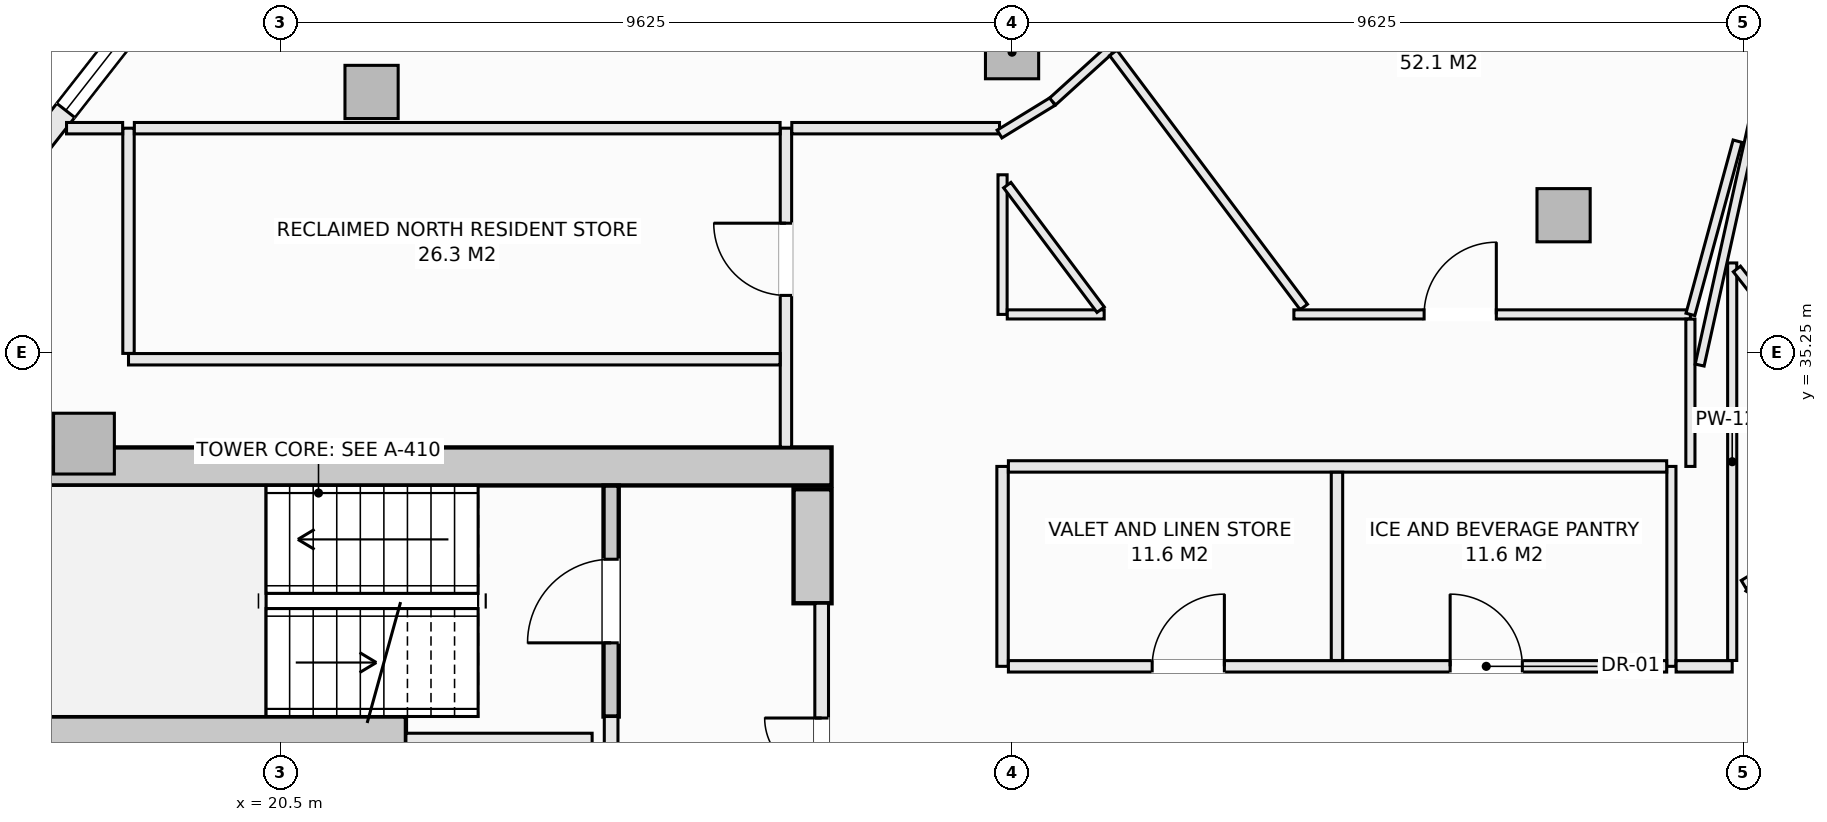
"""IFC4 building model, lengths in metres.
Left out: names, types, materials, properties, quantities, classifications, styles, units other than length and angle.
Written with IfcOpenShell. Run it as: python <this file> out.ifc"""

import sys

from ifc_helpers import new_model, si_unit, direction, frame, frame_2d, origin, origin_2d, place, context, subcontext, project, spatial, rectangle, extrude, element, fill, save


model = new_model("IFC4")
c1 = context("Model", 3, precision=1e-05, world=origin(), true_north=direction((0.0, 1.0)))
c2 = subcontext(c1, "Body", "Model", "MODEL_VIEW")
j1 = project(units=[si_unit("LENGTHUNIT", "METRE"), si_unit("PLANEANGLEUNIT", "RADIAN")], contexts=[c1])
p1 = place(None, origin())
s1 = spatial("IfcSite", under=j1, at=p1, CompositionType="ELEMENT")
p2 = place(p1, origin())
s2 = spatial("IfcBuilding", under=s1, at=p2, CompositionType="ELEMENT")
p3 = place(p2, frame((0.0, 0.0, 262.4)))
s3 = spatial("IfcBuildingStorey", under=s2, at=p3, CompositionType="ELEMENT", Elevation=262.4)
p4 = place(p3, frame((14.25, 33.75, -0.27), z_axis=(0.0, 0.0, 1.0), x_axis=(1.0, 0.0, 0.0)))
e1 = element("IfcWall", 1, at=p4, inside=s3, PredefinedType="SHEAR", context=c2, shape_type="SweptSolid", body=[
    extrude(rectangle(XDim=13.5, YDim=0.5, at=frame_2d((6.75, 0.0))), origin(), (0.0, 0.0, 1.0), 3.3),
])
p5 = place(p3, frame((27.5, 31.95, -0.27), z_axis=(0.0, 0.0, 1.0), x_axis=(0.0, 1.0, 0.0)))
e2 = element("IfcWall", 2, at=p5, inside=s3, PredefinedType="SHEAR", context=c2, shape_type="SweptSolid", body=[
    extrude(rectangle(XDim=1.5, YDim=0.5, at=frame_2d((0.75, 0.0))), origin(), (0.0, 0.0, 1.0), 3.3),
])
p6 = place(p3, frame((14.85, 30.25, -0.27), z_axis=(0.0, 0.0, 1.0), x_axis=(1.0, 0.0, 0.0)))
e3 = element("IfcWall", 3, at=p6, inside=s3, PredefinedType="SHEAR", context=c2, shape_type="SweptSolid", body=[
    extrude(rectangle(XDim=7.3, YDim=0.42, at=frame_2d((3.65, 0.0))), origin(), (0.0, 0.0, 1.0), 3.3),
])
for number, where, z_axis, x_axis in (
    (4, (37.382, 37.055, -0.27), (0.0, 0.0, 1.0), (1.0, 0.0, 0.0)),
    (5, (30.125, 39.2, -0.27), (0.0, 0.0, 1.0), (1.0, 0.0, 0.0)),
    (6, (21.698, 38.677, -0.27), (0.0, 0.0, 1.0), (1.0, 0.0, 0.0)),
):
    element("IfcColumn", number, at=place(p3, frame(where, z_axis=z_axis, x_axis=x_axis)), inside=s3, PredefinedType="COLUMN", context=c2, shape_type="SweptSolid", body=[
        extrude(rectangle(XDim=0.7, YDim=0.7, at=origin_2d()), origin(), (0.0, 0.0, 1.0), 3.3),
    ])
p7 = place(p3, frame((17.914, 34.05, -0.27), z_axis=(0.0, 0.0, 1.0), x_axis=(1.0, 0.0, 0.0)))
e7 = element("IfcColumn", 7, at=p7, inside=s3, PredefinedType="PILASTER", context=c2, shape_type="SweptSolid", body=[
    extrude(rectangle(XDim=0.8, YDim=0.8, at=origin_2d()), origin(), (0.0, 0.0, 1.0), 3.3),
])
p8 = place(p3, frame((16.846, 37.375, 0.0), z_axis=(0.0, 0.0, 1.0), x_axis=(0.616413297421, 0.78742278781, 0.0)))
e8 = element("IfcWall", 8, at=p8, inside=s3, PredefinedType="SOLIDWALL", context=c2, shape_type="SweptSolid", body=[
    extrude(rectangle(XDim=4.888, YDim=0.3, at=frame_2d((2.444, 0.0))), origin(), (0.0, 0.0, 1.0), 2.605),
])
p9 = place(p8, frame((1.344, 0.0, 0.72)))
e9 = element("IfcOpeningElement", 9, at=p9, cuts=e8, PredefinedType="OPENING", context=c2, shape_type="SweptSolid", body=[
    extrude(rectangle(XDim=2.2, YDim=1.65, at=frame_2d((1.1, 0.825))), frame((0.0, 0.16, 0.0), z_axis=(0.0, -1.0, 0.0), x_axis=(1.0, 0.0, 0.0)), (0.0, 0.0, 1.0), 0.32),
])
p10 = place(p3, frame((24.85, 30.46, -0.27), z_axis=(0.0, 0.0, 1.0), x_axis=(0.0, 1.0, 0.0)))
e10 = element("IfcWall", 10, at=p10, inside=s3, PredefinedType="SHEAR", context=c2, shape_type="SweptSolid", body=[
    extrude(rectangle(XDim=3.038, YDim=0.2, at=frame_2d((1.519, 0.0))), origin(), (0.0, 0.0, 1.0), 3.3),
])
p11 = place(p10, frame((0.969, 0.0, 0.27)))
e11 = element("IfcOpeningElement", 11, at=p11, cuts=e10, PredefinedType="OPENING", context=c2, shape_type="SweptSolid", body=[
    extrude(rectangle(XDim=1.1, YDim=2.15, at=frame_2d((0.55, 1.075))), frame((0.0, 0.11, 0.0), z_axis=(0.0, -1.0, 0.0), x_axis=(1.0, 0.0, 0.0)), (0.0, 0.0, 1.0), 0.22),
])
p12 = place(p3, frame((22.15, 30.14, 0.0), z_axis=(0.0, 0.0, 1.0), x_axis=(1.0, 0.0, 0.0)))
e12 = element("IfcWall", 12, at=p12, inside=s3, PredefinedType="SOLIDWALL", context=c2, shape_type="SweptSolid", body=[
    extrude(rectangle(XDim=2.45, YDim=0.2, at=frame_2d((1.225, 0.0))), origin(), (0.0, 0.0, 1.0), 3.03),
])
p13 = place(p3, frame((24.85, 30.04, 0.0), z_axis=(0.0, 0.0, 1.0), x_axis=(0.0, 1.0, 0.0)))
e13 = element("IfcWall", 13, at=p13, inside=s3, PredefinedType="SOLIDWALL", context=c2, shape_type="SweptSolid", body=[
    extrude(rectangle(XDim=0.42, YDim=0.18, at=frame_2d((0.21, 0.0))), origin(), (0.0, 0.0, 1.0), 3.03),
])
p14 = place(p3, frame((27.62, 22.05, 0.0), z_axis=(0.0, 0.0, 1.0), x_axis=(0.0, 1.0, 0.0)))
e14 = element("IfcWall", 14, at=p14, inside=s3, PredefinedType="SOLIDWALL", context=c2, shape_type="SweptSolid", body=[
    extrude(rectangle(XDim=9.9, YDim=0.18, at=frame_2d((4.95, 0.0))), origin(), (0.0, 0.0, 1.0), 3.03),
])
p15 = place(p14, frame((4.475, 0.0, 0.0)))
e15 = element("IfcOpeningElement", 15, at=p15, cuts=e14, PredefinedType="OPENING", context=c2, shape_type="SweptSolid", body=[
    extrude(rectangle(XDim=0.95, YDim=2.1, at=frame_2d((0.475, 1.05))), frame((0.0, 0.1, 0.0), z_axis=(0.0, -1.0, 0.0), x_axis=(1.0, 0.0, 0.0)), (0.0, 0.0, 1.0), 0.2),
])
p16 = place(p14, frame((6.89, 0.0, 0.0)))
e16 = element("IfcOpeningElement", 16, at=p16, cuts=e14, PredefinedType="OPENING", context=c2, shape_type="SweptSolid", body=[
    extrude(rectangle(XDim=1.5, YDim=2.2, at=frame_2d((0.75, 1.1))), frame((0.0, 0.1, 0.0), z_axis=(0.0, -1.0, 0.0), x_axis=(1.0, 0.0, 0.0)), (0.0, 0.0, 1.0), 0.2),
])
p17 = place(p14, frame((1.51, 0.0, 0.0)))
e17 = element("IfcOpeningElement", 17, at=p17, cuts=e14, PredefinedType="OPENING", context=c2, shape_type="SweptSolid", body=[
    extrude(rectangle(XDim=1.5, YDim=2.2, at=frame_2d((0.75, 1.1))), frame((0.0, 0.1, 0.0), z_axis=(0.0, -1.0, 0.0), x_axis=(1.0, 0.0, 0.0)), (0.0, 0.0, 1.0), 0.2),
])
p18 = place(p3, frame((27.15, 34.002, 0.0), z_axis=(0.0, 0.0, 1.0), x_axis=(0.0, 1.0, 0.0)))
e18 = element("IfcWall", 18, at=p18, inside=s3, PredefinedType="PARTITIONING", context=c2, shape_type="SweptSolid", body=[
    extrude(rectangle(XDim=4.198, YDim=0.15, at=frame_2d((2.099, 0.0))), origin(), (0.0, 0.0, 1.0), 3.03),
])
p19 = place(p18, frame((1.998, 0.0, 0.0)))
e19 = element("IfcOpeningElement", 19, at=p19, cuts=e18, PredefinedType="OPENING", context=c2, shape_type="SweptSolid", body=[
    extrude(rectangle(XDim=0.95, YDim=2.1, at=frame_2d((0.475, 1.05))), frame((0.0, 0.085, 0.0), z_axis=(0.0, -1.0, 0.0), x_axis=(1.0, 0.0, 0.0)), (0.0, 0.0, 1.0), 0.17),
])
p20 = place(p3, frame((30.0, 31.12, 0.0), z_axis=(0.0, 0.0, 1.0), x_axis=(0.0, 1.0, 0.0)))
e20 = element("IfcWall", 20, at=p20, inside=s3, PredefinedType="PARTITIONING", context=c2, shape_type="SweptSolid", body=[
    extrude(rectangle(XDim=2.63, YDim=0.15, at=frame_2d((1.315, 0.0))), origin(), (0.0, 0.0, 1.0), 3.03),
])
p21 = place(p3, frame((30.0, 35.75, 0.0), z_axis=(0.0, 0.0, 1.0), x_axis=(0.0, 1.0, 0.0)))
e21 = element("IfcWall", 21, at=p21, inside=s3, PredefinedType="PARTITIONING", context=c2, shape_type="SweptSolid", body=[
    extrude(rectangle(XDim=1.837, YDim=0.12, at=frame_2d((0.918, 0.0))), origin(), (0.0, 0.0, 1.0), 3.03),
])
p22 = place(p3, frame((38.8, 31.12, 0.0), z_axis=(0.0, 0.0, 1.0), x_axis=(0.0, 1.0, 0.0)))
e22 = element("IfcWall", 22, at=p22, inside=s3, PredefinedType="PARTITIONING", context=c2, shape_type="SweptSolid", body=[
    extrude(rectangle(XDim=2.63, YDim=0.12, at=frame_2d((1.315, 0.0))), origin(), (0.0, 0.0, 1.0), 3.03),
])
p23 = place(p3, frame((30.077, 31.12, 0.0), z_axis=(0.0, 0.0, 1.0), x_axis=(1.0, 0.0, 0.0)))
e23 = element("IfcWall", 23, at=p23, inside=s3, PredefinedType="PARTITIONING", context=c2, shape_type="SweptSolid", body=[
    extrude(rectangle(XDim=8.661, YDim=0.15, at=frame_2d((4.331, 0.0))), origin(), (0.0, 0.0, 1.0), 3.03),
])
p24 = place(p23, frame((1.892, 0.0, 0.0)))
e24 = element("IfcOpeningElement", 24, at=p24, cuts=e23, PredefinedType="OPENING", context=c2, shape_type="SweptSolid", body=[
    extrude(rectangle(XDim=0.95, YDim=2.1, at=frame_2d((0.475, 1.05))), frame((0.0, 0.085, 0.0), z_axis=(0.0, -1.0, 0.0), x_axis=(1.0, 0.0, 0.0)), (0.0, 0.0, 1.0), 0.17),
])
p25 = place(p23, frame((5.812, 0.0, 0.0)))
e25 = element("IfcOpeningElement", 25, at=p25, cuts=e23, PredefinedType="OPENING", context=c2, shape_type="SweptSolid", body=[
    extrude(rectangle(XDim=0.95, YDim=2.1, at=frame_2d((0.475, 1.05))), frame((0.0, 0.085, 0.0), z_axis=(0.0, -1.0, 0.0), x_axis=(1.0, 0.0, 0.0)), (0.0, 0.0, 1.0), 0.17),
])
p26 = place(p3, frame((38.862, 31.12, 0.0), z_axis=(0.0, 0.0, 1.0), x_axis=(1.0, 0.0, 0.0)))
e26 = element("IfcWall", 26, at=p26, inside=s3, PredefinedType="PARTITIONING", context=c2, shape_type="SweptSolid", body=[
    extrude(rectangle(XDim=0.738, YDim=0.15, at=frame_2d((0.369, 0.0))), origin(), (0.0, 0.0, 1.0), 3.03),
])
p27 = place(p3, frame((30.077, 33.75, 0.0), z_axis=(0.0, 0.0, 1.0), x_axis=(1.0, 0.0, 0.0)))
e27 = element("IfcWall", 27, at=p27, inside=s3, PredefinedType="PARTITIONING", context=c2, shape_type="SweptSolid", body=[
    extrude(rectangle(XDim=8.661, YDim=0.15, at=frame_2d((4.331, 0.0))), origin(), (0.0, 0.0, 1.0), 3.03),
])
p28 = place(p3, frame((34.4, 31.197, 0.0), z_axis=(0.0, 0.0, 1.0), x_axis=(0.0, 1.0, 0.0)))
e28 = element("IfcWall", 28, at=p28, inside=s3, PredefinedType="PARTITIONING", context=c2, shape_type="SweptSolid", body=[
    extrude(rectangle(XDim=2.476, YDim=0.15, at=frame_2d((1.238, 0.0))), origin(), (0.0, 0.0, 1.0), 3.03),
])
p29 = place(p3, frame((18.5, 35.16, 0.0), z_axis=(0.0, 0.0, 1.0), x_axis=(1.0, 0.0, 0.0)))
e29 = element("IfcWall", 29, at=p29, inside=s3, PredefinedType="PARTITIONING", context=c2, shape_type="SweptSolid", body=[
    extrude(rectangle(XDim=8.573, YDim=0.15, at=frame_2d((4.287, 0.0))), origin(), (0.0, 0.0, 1.0), 3.03),
])
p30 = place(p3, frame((18.5, 35.237, 0.0), z_axis=(0.0, 0.0, 1.0), x_axis=(0.0, 1.0, 0.0)))
e30 = element("IfcWall", 30, at=p30, inside=s3, PredefinedType="PARTITIONING", context=c2, shape_type="SweptSolid", body=[
    extrude(rectangle(XDim=2.963, YDim=0.15, at=frame_2d((1.481, 0.0))), origin(), (0.0, 0.0, 1.0), 3.03),
])
p31 = place(p3, frame((17.685, 38.2, 0.0), z_axis=(0.0, 0.0, 1.0), x_axis=(1.0, 0.0, 0.0)))
e31 = element("IfcWall", 31, at=p31, inside=s3, PredefinedType="PARTITIONING", context=c2, shape_type="SweptSolid", body=[
    extrude(rectangle(XDim=0.738, YDim=0.15, at=frame_2d((0.369, 0.0))), origin(), (0.0, 0.0, 1.0), 3.03),
])
p32 = place(p3, frame((18.577, 38.2, 0.0), z_axis=(0.0, 0.0, 1.0), x_axis=(1.0, 0.0, 0.0)))
e32 = element("IfcWall", 32, at=p32, inside=s3, PredefinedType="PARTITIONING", context=c2, shape_type="SweptSolid", body=[
    extrude(rectangle(XDim=8.496, YDim=0.15, at=frame_2d((4.248, 0.0))), origin(), (0.0, 0.0, 1.0), 3.03),
])
p33 = place(p3, frame((27.227, 38.2, 0.0), z_axis=(0.0, 0.0, 1.0), x_axis=(1.0, 0.0, 0.0)))
e33 = element("IfcWall", 33, at=p33, inside=s3, PredefinedType="PARTITIONING", context=c2, shape_type="SweptSolid", body=[
    extrude(rectangle(XDim=2.733, YDim=0.15, at=frame_2d((1.366, 0.0))), origin(), (0.0, 0.0, 1.0), 3.03),
])
p34 = place(p3, frame((29.96, 38.123, 0.0), z_axis=(0.0, 0.0, 1.0), x_axis=(0.852506956574, 0.522715877885, 0.0)))
e34 = element("IfcWall", 34, at=p34, inside=s3, PredefinedType="PARTITIONING", context=c2, shape_type="SweptSolid", body=[
    extrude(rectangle(XDim=0.819, YDim=0.12, at=frame_2d((0.409, 0.0))), origin(), (0.0, 0.0, 1.0), 3.03),
])
p35 = place(p3, frame((30.658, 38.551, 0.0), z_axis=(0.0, 0.0, 1.0), x_axis=(0.74084279818, 0.671678456097, 0.0)))
e35 = element("IfcWall", 35, at=p35, inside=s3, PredefinedType="PARTITIONING", context=c2, shape_type="SweptSolid", body=[
    extrude(rectangle(XDim=1.027, YDim=0.12, at=frame_2d((0.514, 0.0))), origin(), (0.0, 0.0, 1.0), 3.03),
])
p36 = place(p3, frame((31.456, 39.191, 0.0), z_axis=(0.0, 0.0, 1.0), x_axis=(0.600056078533, -0.799957938029, 0.0)))
e36 = element("IfcWall", 36, at=p36, inside=s3, PredefinedType="PARTITIONING", context=c2, shape_type="SweptSolid", body=[
    extrude(rectangle(XDim=4.179, YDim=0.12, at=frame_2d((2.09, 0.0))), origin(), (0.0, 0.0, 1.0), 2.478),
])
p37 = place(p3, frame((30.062, 35.75, 0.0), z_axis=(0.0, 0.0, 1.0), x_axis=(1.0, 0.0, 0.0)))
e37 = element("IfcWall", 37, at=p37, inside=s3, PredefinedType="PARTITIONING", context=c2, shape_type="SweptSolid", body=[
    extrude(rectangle(XDim=1.275, YDim=0.12, at=frame_2d((0.637, 0.0))), origin(), (0.0, 0.0, 1.0), 3.03),
])
p38 = place(p3, frame((33.833, 35.75, 0.0), z_axis=(0.0, 0.0, 1.0), x_axis=(1.0, 0.0, 0.0)))
e38 = element("IfcWall", 38, at=p38, inside=s3, PredefinedType="PARTITIONING", context=c2, shape_type="SweptSolid", body=[
    extrude(rectangle(XDim=5.217, YDim=0.12, at=frame_2d((2.608, 0.0))), origin(), (0.0, 0.0, 1.0), 2.478),
])
p39 = place(p38, frame((1.713, 0.0, 0.0)))
e39 = element("IfcOpeningElement", 39, at=p39, cuts=e38, PredefinedType="OPENING", context=c2, shape_type="SweptSolid", body=[
    extrude(rectangle(XDim=0.95, YDim=2.1, at=frame_2d((0.475, 1.05))), frame((0.0, 0.07, 0.0), z_axis=(0.0, -1.0, 0.0), x_axis=(1.0, 0.0, 0.0)), (0.0, 0.0, 1.0), 0.14),
])
p40 = place(p3, frame((39.05, 33.75, 0.0), z_axis=(0.0, 0.0, 1.0), x_axis=(0.0, 1.0, 0.0)))
e40 = element("IfcWall", 40, at=p40, inside=s3, PredefinedType="PARTITIONING", context=c2, shape_type="SweptSolid", body=[
    extrude(rectangle(XDim=1.938, YDim=0.12, at=frame_2d((0.969, 0.0))), origin(), (0.0, 0.0, 1.0), 3.03),
])
p41 = place(p3, frame((39.6, 31.197, 0.0), z_axis=(0.0, 0.0, 1.0), x_axis=(0.0, 1.0, 0.0)))
e41 = element("IfcWall", 41, at=p41, inside=s3, PredefinedType="PARTITIONING", context=c2, shape_type="SweptSolid", body=[
    extrude(rectangle(XDim=5.23, YDim=0.12, at=frame_2d((2.615, 0.0))), origin(), (0.0, 0.0, 1.0), 3.03),
])
p42 = place(p3, frame((39.662, 36.348, 0.0), z_axis=(0.0, 0.0, 1.0), x_axis=(0.616212345115, -0.78758005671, 0.0)))
e42 = element("IfcWall", 42, at=p42, inside=s3, PredefinedType="PARTITIONING", context=c2, shape_type="SweptSolid", body=[
    extrude(rectangle(XDim=2.333, YDim=0.12, at=frame_2d((1.167, 0.0))), origin(), (0.0, 0.0, 1.0), 3.03),
])
p43 = place(p3, frame((39.75, 32.199, 0.0), z_axis=(0.0, 0.0, 1.0), x_axis=(0.857702120906, 0.514146935996, 0.0)))
e43 = element("IfcWall", 43, at=p43, inside=s3, PredefinedType="PARTITIONING", context=c2, shape_type="SweptSolid", body=[
    extrude(rectangle(XDim=1.441, YDim=0.12, at=frame_2d((0.721, 0.0))), origin(), (0.0, 0.0, 1.0), 3.03),
])
p44 = place(p3, frame((39.81, 32.163, 0.0), z_axis=(0.0, 0.0, 1.0), x_axis=(0.858011245414, -0.513630901273, 0.0)))
e44 = element("IfcWall", 44, at=p44, inside=s3, PredefinedType="PARTITIONING", context=c2, shape_type="SweptSolid", body=[
    extrude(rectangle(XDim=1.37, YDim=0.12, at=frame_2d((0.685, 0.0))), origin(), (0.0, 0.0, 1.0), 3.03),
])
p45 = place(p3, frame((30.062, 37.451, 0.0), z_axis=(0.0, 0.0, 1.0), x_axis=(0.599790195836, -0.800157310145, 0.0)))
e45 = element("IfcWall", 45, at=p45, inside=s3, PredefinedType="PARTITIONING", context=c2, shape_type="SweptSolid", body=[
    extrude(rectangle(XDim=2.048, YDim=0.12, at=frame_2d((1.024, 0.0))), origin(), (0.0, 0.0, 1.0), 3.03),
])
p46 = place(p3, frame((39.172, 35.083, 0.0), z_axis=(0.0, 0.0, 1.0), x_axis=(0.216048361883, 0.976382663369, 0.0)))
e46 = element("IfcWall", 46, at=p46, inside=s3, PredefinedType="PARTITIONING", context=c2, shape_type="SweptSolid", body=[
    extrude(rectangle(XDim=5.95, YDim=0.12, at=frame_2d((2.975, 0.0))), origin(), (0.0, 0.0, 1.0), 3.03),
])
p47 = place(p3, frame((39.05, 35.75, 0.0), z_axis=(0.0, 0.0, 1.0), x_axis=(0.262548848822, 0.964918702266, 0.0)))
e47 = element("IfcWall", 47, at=p47, inside=s3, PredefinedType="PARTITIONING", context=c2, shape_type="SweptSolid", body=[
    extrude(rectangle(XDim=2.362, YDim=0.12, at=frame_2d((1.181, 0.0))), origin(), (0.0, 0.0, 1.0), 3.03),
])
p48 = place(p9, origin())
e48 = element("IfcWindow", 48, at=p48, inside=s3, PartitioningType="SINGLE_PANEL", PredefinedType="WINDOW", context=c2, shape_type="SweptSolid", body=[
    extrude(rectangle(XDim=2.2, YDim=1.65, at=frame_2d((1.1, 0.825))), frame((0.0, 0.03, 0.0), z_axis=(0.0, -1.0, 0.0), x_axis=(1.0, 0.0, 0.0)), (0.0, 0.0, 1.0), 0.06),
])
fill(e9, e48)
p49 = place(p11, origin())
e49 = element("IfcDoor", 49, at=p49, inside=s3, OperationType="SINGLE_SWING_LEFT", PredefinedType="DOOR", context=c2, shape_type="SweptSolid", body=[
    extrude(rectangle(XDim=1.1, YDim=2.15, at=frame_2d((0.55, 1.075))), frame((0.0, 0.025, 0.0), z_axis=(0.0, -1.0, 0.0), x_axis=(1.0, 0.0, 0.0)), (0.0, 0.0, 1.0), 0.05),
])
fill(e11, e49)
p50 = place(p16, origin())
e50 = element("IfcDoor", 50, at=p50, inside=s3, OperationType="DOUBLE_DOOR_SINGLE_SWING", PredefinedType="DOOR", context=c2, shape_type="SweptSolid", body=[
    extrude(rectangle(XDim=1.5, YDim=2.2, at=frame_2d((0.75, 1.1))), frame((0.0, 0.025, 0.0), z_axis=(0.0, -1.0, 0.0), x_axis=(1.0, 0.0, 0.0)), (0.0, 0.0, 1.0), 0.05),
])
fill(e16, e50)
p51 = place(p24, origin())
e51 = element("IfcDoor", 51, at=p51, inside=s3, OperationType="SINGLE_SWING_RIGHT", PredefinedType="DOOR", context=c2, shape_type="SweptSolid", body=[
    extrude(rectangle(XDim=0.95, YDim=2.1, at=frame_2d((0.475, 1.05))), frame((0.0, 0.025, 0.0), z_axis=(0.0, -1.0, 0.0), x_axis=(1.0, 0.0, 0.0)), (0.0, 0.0, 1.0), 0.05),
])
fill(e24, e51)
p52 = place(p25, origin())
e52 = element("IfcDoor", 52, at=p52, inside=s3, OperationType="SINGLE_SWING_LEFT", PredefinedType="DOOR", context=c2, shape_type="SweptSolid", body=[
    extrude(rectangle(XDim=0.95, YDim=2.1, at=frame_2d((0.475, 1.05))), frame((0.0, 0.025, 0.0), z_axis=(0.0, -1.0, 0.0), x_axis=(1.0, 0.0, 0.0)), (0.0, 0.0, 1.0), 0.05),
])
fill(e25, e52)
p53 = place(p19, origin())
e53 = element("IfcDoor", 53, at=p53, inside=s3, OperationType="SINGLE_SWING_RIGHT", PredefinedType="DOOR", context=c2, shape_type="SweptSolid", body=[
    extrude(rectangle(XDim=0.95, YDim=2.1, at=frame_2d((0.475, 1.05))), frame((0.0, 0.025, 0.0), z_axis=(0.0, -1.0, 0.0), x_axis=(1.0, 0.0, 0.0)), (0.0, 0.0, 1.0), 0.05),
])
fill(e19, e53)
p54 = place(p39, origin())
e54 = element("IfcDoor", 54, at=p54, inside=s3, OperationType="SINGLE_SWING_RIGHT", PredefinedType="DOOR", context=c2, shape_type="SweptSolid", body=[
    extrude(rectangle(XDim=0.95, YDim=2.1, at=frame_2d((0.475, 1.05))), frame((0.0, 0.025, 0.0), z_axis=(0.0, -1.0, 0.0), x_axis=(1.0, 0.0, 0.0)), (0.0, 0.0, 1.0), 0.05),
])
fill(e39, e54)
save(model, sys.argv[1])
